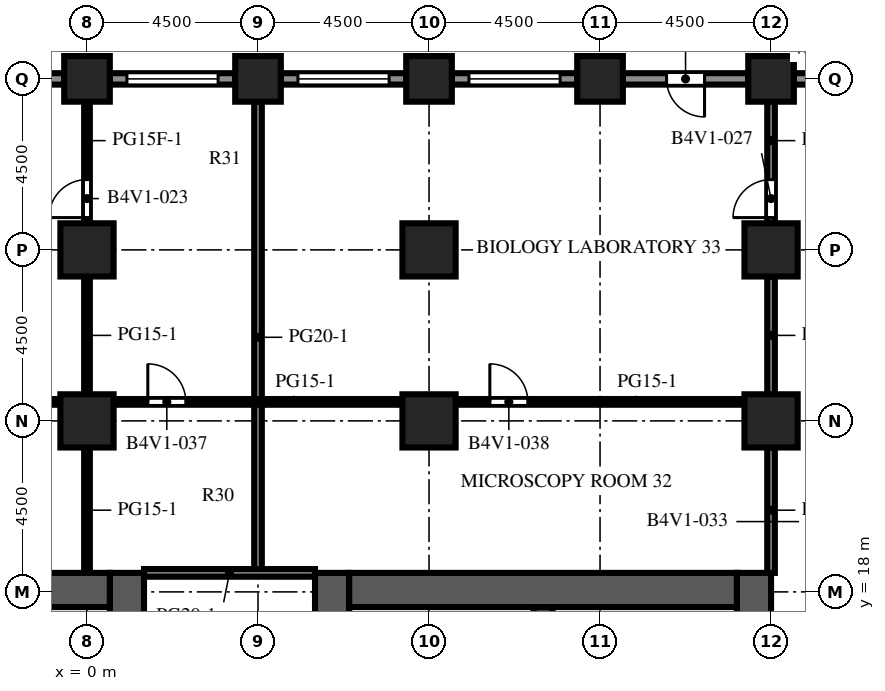
"""IFC4 building model, lengths in metres.
Left out: names, types, materials, properties, quantities, classifications, styles, units other than length and angle.
Written with IfcOpenShell. Run it as: python <this file> out.ifc"""

import sys

from ifc_helpers import new_model, si_unit, direction, frame, frame_2d, origin, origin_2d, place, context, subcontext, project, spatial, rectangle, extrude, element, fill, save


model = new_model("IFC4")
c1 = context("Model", 3, precision=1e-05, world=origin(), true_north=direction((0.0, 1.0)))
c2 = subcontext(c1, "Body", "Model", "MODEL_VIEW")
j1 = project(units=[si_unit("LENGTHUNIT", "METRE"), si_unit("PLANEANGLEUNIT", "RADIAN")], contexts=[c1])
p1 = place(None, origin())
s1 = spatial("IfcSite", under=j1, at=p1, CompositionType="ELEMENT")
p2 = place(p1, origin())
s2 = spatial("IfcBuilding", under=s1, at=p2, CompositionType="ELEMENT")
p3 = place(p2, frame((0.0, 0.0, 133.1)))
s3 = spatial("IfcBuildingStorey", under=s2, at=p3, CompositionType="ELEMENT", Elevation=133.1)
for number, where, z_axis, x_axis in (
    (1, (0.0, 31.5, 0.0), (0.0, 0.0, 1.0), (1.0, 0.0, 0.0)),
    (2, (4.5, 31.5, 0.0), (0.0, 0.0, 1.0), (1.0, 0.0, 0.0)),
    (3, (9.0, 31.5, 0.0), (0.0, 0.0, 1.0), (1.0, 0.0, 0.0)),
    (4, (13.5, 31.5, 0.0), (0.0, 0.0, 1.0), (1.0, 0.0, 0.0)),
    (5, (18.0, 31.5, 0.0), (0.0, 0.0, 1.0), (1.0, 0.0, 0.0)),
):
    element("IfcColumn", number, at=place(p3, frame(where, z_axis=z_axis, x_axis=x_axis)), inside=s3, PredefinedType="COLUMN", context=c2, shape_type="SweptSolid", body=[
        extrude(rectangle(XDim=1.2, YDim=1.2, at=origin_2d()), origin(), (0.0, 0.0, 1.0), 4.1),
    ])
for number, where, z_axis, x_axis in (
    (6, (0.0, 22.5, 0.0), (0.0, 0.0, 1.0), (1.0, 0.0, 0.0)),
    (7, (0.0, 27.0, 0.0), (0.0, 0.0, 1.0), (1.0, 0.0, 0.0)),
    (8, (9.0, 22.5, 0.0), (0.0, 0.0, 1.0), (1.0, 0.0, 0.0)),
    (9, (9.0, 27.0, 0.0), (0.0, 0.0, 1.0), (1.0, 0.0, 0.0)),
    (10, (18.0, 22.5, 0.0), (0.0, 0.0, 1.0), (1.0, 0.0, 0.0)),
    (11, (18.0, 27.0, 0.0), (0.0, 0.0, 1.0), (1.0, 0.0, 0.0)),
):
    element("IfcColumn", number, at=place(p3, frame(where, z_axis=z_axis, x_axis=x_axis)), inside=s3, PredefinedType="COLUMN", context=c2, shape_type="SweptSolid", body=[
        extrude(rectangle(XDim=1.4, YDim=1.4, at=origin_2d()), origin(), (0.0, 0.0, 1.0), 4.1),
    ])
p4 = place(p3, frame((1.05, -9.0, 0.0), z_axis=(0.0, 0.0, 1.0), x_axis=(0.0, 1.0, 0.0)))
e12 = element("IfcWall", 12, at=p4, inside=s3, PredefinedType="SHEAR", context=c2, shape_type="SweptSolid", body=[
    extrude(rectangle(XDim=27.5, YDim=0.9, at=frame_2d((13.75, 0.0))), origin(), (0.0, 0.0, 1.0), 4.1),
])
p5 = place(p4, frame((12.55, 0.0, 0.0)))
e13 = element("IfcOpeningElement", 13, at=p5, cuts=e12, PredefinedType="OPENING", context=c2, shape_type="SweptSolid", body=[
    extrude(rectangle(XDim=2.4, YDim=2.4, at=frame_2d((1.2, 1.2))), frame((0.0, 0.46, 0.0), z_axis=(0.0, -1.0, 0.0), x_axis=(1.0, 0.0, 0.0)), (0.0, 0.0, 1.0), 0.92),
])
p6 = place(p4, frame((3.975, 0.0, 0.0)))
e14 = element("IfcOpeningElement", 14, at=p6, cuts=e12, PredefinedType="OPENING", context=c2, shape_type="SweptSolid", body=[
    extrude(rectangle(XDim=1.2, YDim=2.1, at=frame_2d((0.6, 1.05))), frame((0.0, 0.46, 0.0), z_axis=(0.0, -1.0, 0.0), x_axis=(1.0, 0.0, 0.0)), (0.0, 0.0, 1.0), 0.92),
])
p7 = place(p4, frame((22.325, 0.0, 0.0)))
e15 = element("IfcOpeningElement", 15, at=p7, cuts=e12, PredefinedType="OPENING", context=c2, shape_type="SweptSolid", body=[
    extrude(rectangle(XDim=1.2, YDim=2.1, at=frame_2d((0.6, 1.05))), frame((0.0, 0.46, 0.0), z_axis=(0.0, -1.0, 0.0), x_axis=(1.0, 0.0, 0.0)), (0.0, 0.0, 1.0), 0.92),
])
p8 = place(p3, frame((-9.6, 18.05, 0.0), z_axis=(0.0, 0.0, 1.0), x_axis=(1.0, 0.0, 0.0)))
e16 = element("IfcWall", 16, at=p8, inside=s3, PredefinedType="SHEAR", context=c2, shape_type="SweptSolid", body=[
    extrude(rectangle(XDim=10.2, YDim=0.9, at=frame_2d((5.1, 0.0))), origin(), (0.0, 0.0, 1.0), 4.1),
])
p9 = place(p3, frame((6.45, -9.0, 0.0), z_axis=(0.0, 0.0, 1.0), x_axis=(0.0, 1.0, 0.0)))
e17 = element("IfcWall", 17, at=p9, inside=s3, PredefinedType="SHEAR", context=c2, shape_type="SweptSolid", body=[
    extrude(rectangle(XDim=27.5, YDim=0.9, at=frame_2d((13.75, 0.0))), origin(), (0.0, 0.0, 1.0), 4.1),
])
p10 = place(p9, frame((12.55, 0.0, 0.0)))
e18 = element("IfcOpeningElement", 18, at=p10, cuts=e17, PredefinedType="OPENING", context=c2, shape_type="SweptSolid", body=[
    extrude(rectangle(XDim=2.4, YDim=2.4, at=frame_2d((1.2, 1.2))), frame((0.0, 0.46, 0.0), z_axis=(0.0, -1.0, 0.0), x_axis=(1.0, 0.0, 0.0)), (0.0, 0.0, 1.0), 0.92),
])
p11 = place(p9, frame((3.975, 0.0, 0.0)))
e19 = element("IfcOpeningElement", 19, at=p11, cuts=e17, PredefinedType="OPENING", context=c2, shape_type="SweptSolid", body=[
    extrude(rectangle(XDim=1.2, YDim=2.1, at=frame_2d((0.6, 1.05))), frame((0.0, 0.46, 0.0), z_axis=(0.0, -1.0, 0.0), x_axis=(1.0, 0.0, 0.0)), (0.0, 0.0, 1.0), 0.92),
])
p12 = place(p9, frame((22.325, 0.0, 0.0)))
e20 = element("IfcOpeningElement", 20, at=p12, cuts=e17, PredefinedType="OPENING", context=c2, shape_type="SweptSolid", body=[
    extrude(rectangle(XDim=1.2, YDim=2.1, at=frame_2d((0.6, 1.05))), frame((0.0, 0.46, 0.0), z_axis=(0.0, -1.0, 0.0), x_axis=(1.0, 0.0, 0.0)), (0.0, 0.0, 1.0), 0.92),
])
p13 = place(p3, frame((17.55, -9.0, 0.0), z_axis=(0.0, 0.0, 1.0), x_axis=(0.0, 1.0, 0.0)))
e21 = element("IfcWall", 21, at=p13, inside=s3, PredefinedType="SHEAR", context=c2, shape_type="SweptSolid", body=[
    extrude(rectangle(XDim=27.5, YDim=0.9, at=frame_2d((13.75, 0.0))), origin(), (0.0, 0.0, 1.0), 4.1),
])
p14 = place(p13, frame((12.55, 0.0, 0.0)))
e22 = element("IfcOpeningElement", 22, at=p14, cuts=e21, PredefinedType="OPENING", context=c2, shape_type="SweptSolid", body=[
    extrude(rectangle(XDim=2.4, YDim=2.4, at=frame_2d((1.2, 1.2))), frame((0.0, 0.46, 0.0), z_axis=(0.0, -1.0, 0.0), x_axis=(1.0, 0.0, 0.0)), (0.0, 0.0, 1.0), 0.92),
])
p15 = place(p13, frame((6.825, 0.0, 0.0)))
e23 = element("IfcOpeningElement", 23, at=p15, cuts=e21, PredefinedType="OPENING", context=c2, shape_type="SweptSolid", body=[
    extrude(rectangle(XDim=1.2, YDim=2.1, at=frame_2d((0.6, 1.05))), frame((0.0, 0.46, 0.0), z_axis=(0.0, -1.0, 0.0), x_axis=(1.0, 0.0, 0.0)), (0.0, 0.0, 1.0), 0.92),
])
p16 = place(p13, frame((19.475, 0.0, 0.0)))
e24 = element("IfcOpeningElement", 24, at=p16, cuts=e21, PredefinedType="OPENING", context=c2, shape_type="SweptSolid", body=[
    extrude(rectangle(XDim=1.2, YDim=2.1, at=frame_2d((0.6, 1.05))), frame((0.0, 0.46, 0.0), z_axis=(0.0, -1.0, 0.0), x_axis=(1.0, 0.0, 0.0)), (0.0, 0.0, 1.0), 0.92),
])
p17 = place(p3, frame((6.9, 18.05, 0.0), z_axis=(0.0, 0.0, 1.0), x_axis=(1.0, 0.0, 0.0)))
e25 = element("IfcWall", 25, at=p17, inside=s3, PredefinedType="SHEAR", context=c2, shape_type="SweptSolid", body=[
    extrude(rectangle(XDim=10.2, YDim=0.9, at=frame_2d((5.1, 0.0))), origin(), (0.0, 0.0, 1.0), 4.1),
])
p18 = place(p3, frame((12.0, 10.25, 0.0), z_axis=(0.0, 0.0, 1.0), x_axis=(0.0, 1.0, 0.0)))
e26 = element("IfcWall", 26, at=p18, inside=s3, PredefinedType="SHEAR", context=c2, shape_type="SweptSolid", body=[
    extrude(rectangle(XDim=7.35, YDim=0.5, at=frame_2d((3.675, 0.0))), origin(), (0.0, 0.0, 1.0), 4.1),
])
p19 = place(p3, frame((18.6, 31.5, 0.0), z_axis=(0.0, 0.0, 1.0), x_axis=(1.0, 0.0, 0.0)))
e27 = element("IfcWall", 27, at=p19, inside=s3, PredefinedType="SOLIDWALL", context=c2, shape_type="SweptSolid", body=[
    extrude(rectangle(XDim=3.3, YDim=0.3, at=frame_2d((1.65, 0.0))), origin(), (0.0, 0.0, 1.0), 2.75),
])
p20 = place(p19, frame((0.525, 0.0, 0.8)))
e28 = element("IfcOpeningElement", 28, at=p20, cuts=e27, PredefinedType="OPENING", context=c2, shape_type="SweptSolid", body=[
    extrude(rectangle(XDim=1.2, YDim=1.7, at=frame_2d((0.6, 0.85))), frame((0.0, 0.16, 0.0), z_axis=(0.0, -1.0, 0.0), x_axis=(1.0, 0.0, 0.0)), (0.0, 0.0, 1.0), 0.32),
])
p21 = place(p3, frame((14.1, 31.5, 0.0), z_axis=(0.0, 0.0, 1.0), x_axis=(1.0, 0.0, 0.0)))
e29 = element("IfcWall", 29, at=p21, inside=s3, PredefinedType="SOLIDWALL", context=c2, shape_type="SweptSolid", body=[
    extrude(rectangle(XDim=3.3, YDim=0.3, at=frame_2d((1.65, 0.0))), origin(), (0.0, 0.0, 1.0), 2.75),
])
p22 = place(p21, frame((1.15, 0.0, 0.0)))
e30 = element("IfcOpeningElement", 30, at=p22, cuts=e29, PredefinedType="OPENING", context=c2, shape_type="SweptSolid", body=[
    extrude(rectangle(XDim=1.0, YDim=2.2, at=frame_2d((0.5, 1.1))), frame((0.0, 0.16, 0.0), z_axis=(0.0, -1.0, 0.0), x_axis=(1.0, 0.0, 0.0)), (0.0, 0.0, 1.0), 0.32),
])
p23 = place(p3, frame((9.6, 31.5, 0.0), z_axis=(0.0, 0.0, 1.0), x_axis=(1.0, 0.0, 0.0)))
e31 = element("IfcWall", 31, at=p23, inside=s3, PredefinedType="SOLIDWALL", context=c2, shape_type="SweptSolid", body=[
    extrude(rectangle(XDim=3.3, YDim=0.3, at=frame_2d((1.65, 0.0))), origin(), (0.0, 0.0, 1.0), 2.75),
])
p24 = place(p23, frame((0.45, 0.0, 0.8)))
e32 = element("IfcOpeningElement", 32, at=p24, cuts=e31, PredefinedType="OPENING", context=c2, shape_type="SweptSolid", body=[
    extrude(rectangle(XDim=2.4, YDim=1.7, at=frame_2d((1.2, 0.85))), frame((0.0, 0.16, 0.0), z_axis=(0.0, -1.0, 0.0), x_axis=(1.0, 0.0, 0.0)), (0.0, 0.0, 1.0), 0.32),
])
p25 = place(p3, frame((5.1, 31.5, 0.0), z_axis=(0.0, 0.0, 1.0), x_axis=(1.0, 0.0, 0.0)))
e33 = element("IfcWall", 33, at=p25, inside=s3, PredefinedType="SOLIDWALL", context=c2, shape_type="SweptSolid", body=[
    extrude(rectangle(XDim=3.3, YDim=0.3, at=frame_2d((1.65, 0.0))), origin(), (0.0, 0.0, 1.0), 2.75),
])
p26 = place(p25, frame((0.45, 0.0, 0.8)))
e34 = element("IfcOpeningElement", 34, at=p26, cuts=e33, PredefinedType="OPENING", context=c2, shape_type="SweptSolid", body=[
    extrude(rectangle(XDim=2.4, YDim=1.7, at=frame_2d((1.2, 0.85))), frame((0.0, 0.16, 0.0), z_axis=(0.0, -1.0, 0.0), x_axis=(1.0, 0.0, 0.0)), (0.0, 0.0, 1.0), 0.32),
])
p27 = place(p3, frame((0.6, 31.5, 0.0), z_axis=(0.0, 0.0, 1.0), x_axis=(1.0, 0.0, 0.0)))
e35 = element("IfcWall", 35, at=p27, inside=s3, PredefinedType="SOLIDWALL", context=c2, shape_type="SweptSolid", body=[
    extrude(rectangle(XDim=3.3, YDim=0.3, at=frame_2d((1.65, 0.0))), origin(), (0.0, 0.0, 1.0), 2.75),
])
p28 = place(p27, frame((0.45, 0.0, 0.8)))
e36 = element("IfcOpeningElement", 36, at=p28, cuts=e35, PredefinedType="OPENING", context=c2, shape_type="SweptSolid", body=[
    extrude(rectangle(XDim=2.4, YDim=1.7, at=frame_2d((1.2, 0.85))), frame((0.0, 0.16, 0.0), z_axis=(0.0, -1.0, 0.0), x_axis=(1.0, 0.0, 0.0)), (0.0, 0.0, 1.0), 0.32),
])
p29 = place(p3, frame((-3.9, 31.5, 0.0), z_axis=(0.0, 0.0, 1.0), x_axis=(1.0, 0.0, 0.0)))
e37 = element("IfcWall", 37, at=p29, inside=s3, PredefinedType="SOLIDWALL", context=c2, shape_type="SweptSolid", body=[
    extrude(rectangle(XDim=3.3, YDim=0.3, at=frame_2d((1.65, 0.0))), origin(), (0.0, 0.0, 1.0), 2.75),
])
p30 = place(p29, frame((0.45, 0.0, 0.8)))
e38 = element("IfcOpeningElement", 38, at=p30, cuts=e37, PredefinedType="OPENING", context=c2, shape_type="SweptSolid", body=[
    extrude(rectangle(XDim=2.4, YDim=1.7, at=frame_2d((1.2, 0.85))), frame((0.0, 0.16, 0.0), z_axis=(0.0, -1.0, 0.0), x_axis=(1.0, 0.0, 0.0)), (0.0, 0.0, 1.0), 0.32),
])
p31 = place(p3, frame((-0.8, 14.807, 0.0), z_axis=(0.0, 0.0, 1.0), x_axis=(0.0, 1.0, 0.0)))
e39 = element("IfcWall", 39, at=p31, inside=s3, PredefinedType="PARTITIONING", context=c2, shape_type="SweptSolid", body=[
    extrude(rectangle(XDim=2.793, YDim=0.1, at=frame_2d((1.396, 0.0))), origin(), (0.0, 0.0, 1.0), 3.65),
])
p32 = place(p31, frame((0.896, 0.0, 0.0)))
e40 = element("IfcOpeningElement", 40, at=p32, cuts=e39, PredefinedType="OPENING", context=c2, shape_type="SweptSolid", body=[
    extrude(rectangle(XDim=1.0, YDim=2.1, at=frame_2d((0.5, 1.05))), frame((0.0, 0.06, 0.0), z_axis=(0.0, -1.0, 0.0), x_axis=(1.0, 0.0, 0.0)), (0.0, 0.0, 1.0), 0.12),
])
p33 = place(p3, frame((8.3, 14.807, 0.0), z_axis=(0.0, 0.0, 1.0), x_axis=(0.0, 1.0, 0.0)))
e41 = element("IfcWall", 41, at=p33, inside=s3, PredefinedType="PARTITIONING", context=c2, shape_type="SweptSolid", body=[
    extrude(rectangle(XDim=2.793, YDim=0.1, at=frame_2d((1.396, 0.0))), origin(), (0.0, 0.0, 1.0), 3.65),
])
p34 = place(p33, frame((0.896, 0.0, 0.0)))
e42 = element("IfcOpeningElement", 42, at=p34, cuts=e41, PredefinedType="OPENING", context=c2, shape_type="SweptSolid", body=[
    extrude(rectangle(XDim=1.0, YDim=2.1, at=frame_2d((0.5, 1.05))), frame((0.0, 0.06, 0.0), z_axis=(0.0, -1.0, 0.0), x_axis=(1.0, 0.0, 0.0)), (0.0, 0.0, 1.0), 0.12),
])
p35 = place(p3, frame((0.0, 18.5, 0.0), z_axis=(0.0, 0.0, 1.0), x_axis=(0.0, 1.0, 0.0)))
e43 = element("IfcWall", 43, at=p35, inside=s3, PredefinedType="PARTITIONING", context=c2, shape_type="SweptSolid", body=[
    extrude(rectangle(XDim=3.3, YDim=0.15, at=frame_2d((1.65, 0.0))), origin(), (0.0, 0.0, 1.0), 3.65),
])
p36 = place(p3, frame((0.0, 23.2, 0.0), z_axis=(0.0, 0.0, 1.0), x_axis=(0.0, 1.0, 0.0)))
e44 = element("IfcWall", 44, at=p36, inside=s3, PredefinedType="PARTITIONING", context=c2, shape_type="SweptSolid", body=[
    extrude(rectangle(XDim=3.1, YDim=0.15, at=frame_2d((1.55, 0.0))), origin(), (0.0, 0.0, 1.0), 3.65),
])
p37 = place(p3, frame((0.0, 30.9, 0.0), z_axis=(0.0, 0.0, 1.0), x_axis=(0.0, -1.0, 0.0)))
e45 = element("IfcWall", 45, at=p37, inside=s3, PredefinedType="PARTITIONING", context=c2, shape_type="SweptSolid", body=[
    extrude(rectangle(XDim=3.2, YDim=0.15, at=frame_2d((1.6, 0.0))), origin(), (0.0, 0.0, 1.0), 3.65),
])
p38 = place(p37, frame((2.05, 0.0, 0.0)))
e46 = element("IfcOpeningElement", 46, at=p38, cuts=e45, PredefinedType="OPENING", context=c2, shape_type="SweptSolid", body=[
    extrude(rectangle(XDim=1.0, YDim=2.1, at=frame_2d((0.5, 1.05))), frame((0.0, 0.085, 0.0), z_axis=(0.0, -1.0, 0.0), x_axis=(1.0, 0.0, 0.0)), (0.0, 0.0, 1.0), 0.17),
])
p39 = place(p3, frame((4.5, 18.5, 0.0), z_axis=(0.0, 0.0, 1.0), x_axis=(0.0, 1.0, 0.0)))
e47 = element("IfcWall", 47, at=p39, inside=s3, PredefinedType="PARTITIONING", context=c2, shape_type="SweptSolid", body=[
    extrude(rectangle(XDim=12.4, YDim=0.2, at=frame_2d((6.2, 0.0))), origin(), (0.0, 0.0, 1.0), 3.65),
])
p40 = place(p3, frame((18.0, 18.5, 0.0), z_axis=(0.0, 0.0, 1.0), x_axis=(0.0, 1.0, 0.0)))
e48 = element("IfcWall", 48, at=p40, inside=s3, PredefinedType="PARTITIONING", context=c2, shape_type="SweptSolid", body=[
    extrude(rectangle(XDim=3.3, YDim=0.2, at=frame_2d((1.65, 0.0))), origin(), (0.0, 0.0, 1.0), 3.65),
])
p41 = place(p3, frame((18.0, 23.2, 0.0), z_axis=(0.0, 0.0, 1.0), x_axis=(0.0, 1.0, 0.0)))
e49 = element("IfcWall", 49, at=p41, inside=s3, PredefinedType="PARTITIONING", context=c2, shape_type="SweptSolid", body=[
    extrude(rectangle(XDim=3.1, YDim=0.2, at=frame_2d((1.55, 0.0))), origin(), (0.0, 0.0, 1.0), 3.65),
])
p42 = place(p3, frame((18.0, 27.7, 0.0), z_axis=(0.0, 0.0, 1.0), x_axis=(0.0, 1.0, 0.0)))
e50 = element("IfcWall", 50, at=p42, inside=s3, PredefinedType="PARTITIONING", context=c2, shape_type="SweptSolid", body=[
    extrude(rectangle(XDim=3.2, YDim=0.2, at=frame_2d((1.6, 0.0))), origin(), (0.0, 0.0, 1.0), 3.65),
])
p43 = place(p42, frame((0.15, 0.0, 0.0)))
e51 = element("IfcOpeningElement", 51, at=p43, cuts=e50, PredefinedType="OPENING", context=c2, shape_type="SweptSolid", body=[
    extrude(rectangle(XDim=1.0, YDim=2.1, at=frame_2d((0.5, 1.05))), frame((0.0, 0.11, 0.0), z_axis=(0.0, -1.0, 0.0), x_axis=(1.0, 0.0, 0.0)), (0.0, 0.0, 1.0), 0.22),
])
p44 = place(p3, frame((1.5, 18.5, 0.0), z_axis=(0.0, 0.0, 1.0), x_axis=(1.0, 0.0, 0.0)))
e52 = element("IfcWall", 52, at=p44, inside=s3, PredefinedType="PARTITIONING", context=c2, shape_type="SweptSolid", body=[
    extrude(rectangle(XDim=4.5, YDim=0.2, at=frame_2d((2.25, 0.0))), origin(), (0.0, 0.0, 1.0), 3.65),
])
p45 = place(p3, frame((-0.7, 23.0, 0.0), z_axis=(0.0, 0.0, 1.0), x_axis=(-1.0, 0.0, 0.0)))
e53 = element("IfcWall", 53, at=p45, inside=s3, PredefinedType="PARTITIONING", context=c2, shape_type="SweptSolid", body=[
    extrude(rectangle(XDim=7.6, YDim=0.15, at=frame_2d((3.8, 0.0))), origin(), (0.0, 0.0, 1.0), 3.65),
])
p46 = place(p45, frame((4.7, 0.0, 0.0)))
e54 = element("IfcOpeningElement", 54, at=p46, cuts=e53, PredefinedType="OPENING", context=c2, shape_type="SweptSolid", body=[
    extrude(rectangle(XDim=1.0, YDim=2.1, at=frame_2d((0.5, 1.05))), frame((0.0, 0.085, 0.0), z_axis=(0.0, -1.0, 0.0), x_axis=(1.0, 0.0, 0.0)), (0.0, 0.0, 1.0), 0.17),
])
p47 = place(p3, frame((8.3, 23.0, 0.0), z_axis=(0.0, 0.0, 1.0), x_axis=(-1.0, 0.0, 0.0)))
e55 = element("IfcWall", 55, at=p47, inside=s3, PredefinedType="PARTITIONING", context=c2, shape_type="SweptSolid", body=[
    extrude(rectangle(XDim=7.6, YDim=0.15, at=frame_2d((3.8, 0.0))), origin(), (0.0, 0.0, 1.0), 3.65),
])
p48 = place(p47, frame((5.7, 0.0, 0.0)))
e56 = element("IfcOpeningElement", 56, at=p48, cuts=e55, PredefinedType="OPENING", context=c2, shape_type="SweptSolid", body=[
    extrude(rectangle(XDim=1.0, YDim=2.1, at=frame_2d((0.5, 1.05))), frame((0.0, 0.085, 0.0), z_axis=(0.0, -1.0, 0.0), x_axis=(1.0, 0.0, 0.0)), (0.0, 0.0, 1.0), 0.17),
])
p49 = place(p3, frame((17.3, 23.0, 0.0), z_axis=(0.0, 0.0, 1.0), x_axis=(-1.0, 0.0, 0.0)))
e57 = element("IfcWall", 57, at=p49, inside=s3, PredefinedType="PARTITIONING", context=c2, shape_type="SweptSolid", body=[
    extrude(rectangle(XDim=7.6, YDim=0.15, at=frame_2d((3.8, 0.0))), origin(), (0.0, 0.0, 1.0), 3.65),
])
p50 = place(p49, frame((5.7, 0.0, 0.0)))
e58 = element("IfcOpeningElement", 58, at=p50, cuts=e57, PredefinedType="OPENING", context=c2, shape_type="SweptSolid", body=[
    extrude(rectangle(XDim=1.0, YDim=2.1, at=frame_2d((0.5, 1.05))), frame((0.0, 0.085, 0.0), z_axis=(0.0, -1.0, 0.0), x_axis=(1.0, 0.0, 0.0)), (0.0, 0.0, 1.0), 0.17),
])
p51 = place(p22, origin())
e59 = element("IfcDoor", 59, at=p51, inside=s3, OperationType="SINGLE_SWING_RIGHT", PredefinedType="DOOR", context=c2, shape_type="SweptSolid", body=[
    extrude(rectangle(XDim=1.0, YDim=2.2, at=frame_2d((0.5, 1.1))), frame((0.0, 0.025, 0.0), z_axis=(0.0, -1.0, 0.0), x_axis=(1.0, 0.0, 0.0)), (0.0, 0.0, 1.0), 0.05),
])
fill(e30, e59)
p52 = place(p24, origin())
e60 = element("IfcWindow", 60, at=p52, inside=s3, PartitioningType="SINGLE_PANEL", PredefinedType="WINDOW", context=c2, shape_type="SweptSolid", body=[
    extrude(rectangle(XDim=2.4, YDim=1.7, at=frame_2d((1.2, 0.85))), frame((0.0, 0.03, 0.0), z_axis=(0.0, -1.0, 0.0), x_axis=(1.0, 0.0, 0.0)), (0.0, 0.0, 1.0), 0.06),
])
fill(e32, e60)
p53 = place(p26, origin())
e61 = element("IfcWindow", 61, at=p53, inside=s3, PartitioningType="SINGLE_PANEL", PredefinedType="WINDOW", context=c2, shape_type="SweptSolid", body=[
    extrude(rectangle(XDim=2.4, YDim=1.7, at=frame_2d((1.2, 0.85))), frame((0.0, 0.03, 0.0), z_axis=(0.0, -1.0, 0.0), x_axis=(1.0, 0.0, 0.0)), (0.0, 0.0, 1.0), 0.06),
])
fill(e34, e61)
p54 = place(p28, origin())
e62 = element("IfcWindow", 62, at=p54, inside=s3, PartitioningType="SINGLE_PANEL", PredefinedType="WINDOW", context=c2, shape_type="SweptSolid", body=[
    extrude(rectangle(XDim=2.4, YDim=1.7, at=frame_2d((1.2, 0.85))), frame((0.0, 0.03, 0.0), z_axis=(0.0, -1.0, 0.0), x_axis=(1.0, 0.0, 0.0)), (0.0, 0.0, 1.0), 0.06),
])
fill(e36, e62)
p55 = place(p38, origin())
e63 = element("IfcDoor", 63, at=p55, inside=s3, OperationType="SINGLE_SWING_RIGHT", PredefinedType="DOOR", context=c2, shape_type="SweptSolid", body=[
    extrude(rectangle(XDim=1.0, YDim=2.1, at=frame_2d((0.5, 1.05))), frame((0.0, 0.025, 0.0), z_axis=(0.0, -1.0, 0.0), x_axis=(1.0, 0.0, 0.0)), (0.0, 0.0, 1.0), 0.05),
])
fill(e46, e63)
p56 = place(p43, origin())
e64 = element("IfcDoor", 64, at=p56, inside=s3, OperationType="SINGLE_SWING_LEFT", PredefinedType="DOOR", context=c2, shape_type="SweptSolid", body=[
    extrude(rectangle(XDim=1.0, YDim=2.1, at=frame_2d((0.5, 1.05))), frame((0.0, 0.025, 0.0), z_axis=(0.0, -1.0, 0.0), x_axis=(1.0, 0.0, 0.0)), (0.0, 0.0, 1.0), 0.05),
])
fill(e51, e64)
p57 = place(p48, origin())
e65 = element("IfcDoor", 65, at=p57, inside=s3, OperationType="SINGLE_SWING_RIGHT", PredefinedType="DOOR", context=c2, shape_type="SweptSolid", body=[
    extrude(rectangle(XDim=1.0, YDim=2.1, at=frame_2d((0.5, 1.05))), frame((0.0, 0.025, 0.0), z_axis=(0.0, -1.0, 0.0), x_axis=(1.0, 0.0, 0.0)), (0.0, 0.0, 1.0), 0.05),
])
fill(e56, e65)
p58 = place(p50, origin())
e66 = element("IfcDoor", 66, at=p58, inside=s3, OperationType="SINGLE_SWING_RIGHT", PredefinedType="DOOR", context=c2, shape_type="SweptSolid", body=[
    extrude(rectangle(XDim=1.0, YDim=2.1, at=frame_2d((0.5, 1.05))), frame((0.0, 0.025, 0.0), z_axis=(0.0, -1.0, 0.0), x_axis=(1.0, 0.0, 0.0)), (0.0, 0.0, 1.0), 0.05),
])
fill(e58, e66)
save(model, sys.argv[1])
